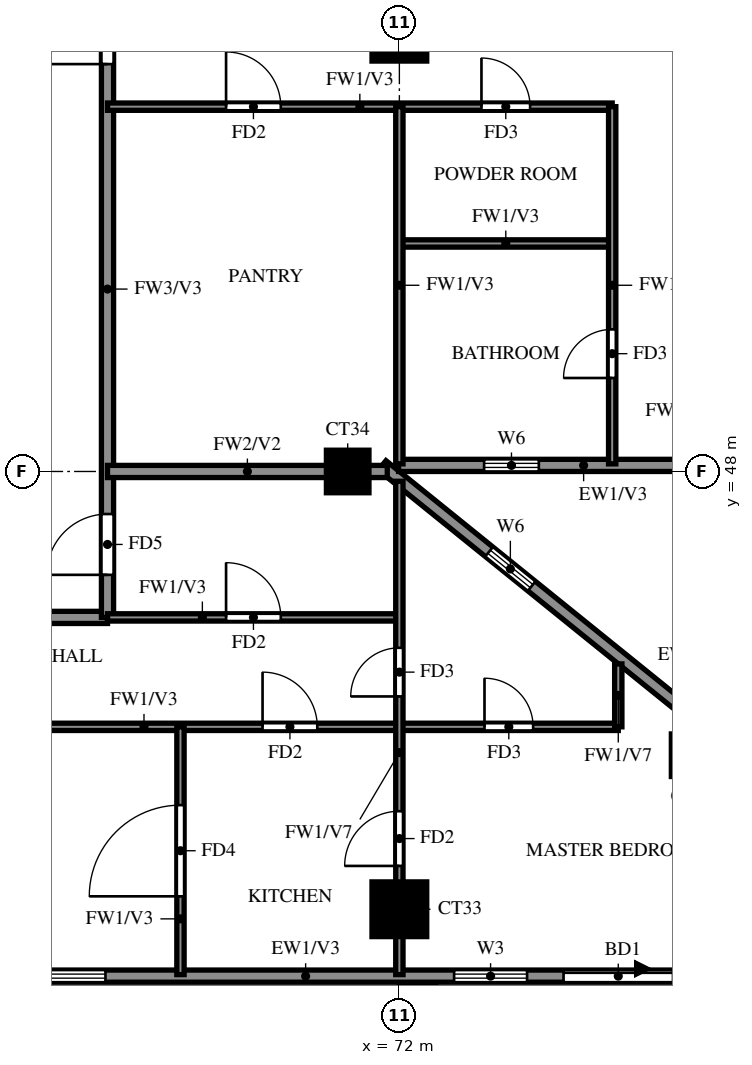
"""IFC4 building model, lengths in metres.
Left out: names, types, materials, properties, quantities, classifications, styles, units other than length and angle.
Written with IfcOpenShell. Run it as: python <this file> out.ifc"""

import sys

from ifc_helpers import new_model, si_unit, direction, frame, frame_2d, origin, origin_2d, place, context, subcontext, project, spatial, rectangle, extrude, source, transform, mapped, element, fill, save


model = new_model("IFC4")
c1 = context("Model", 3, precision=1e-05, world=origin(), true_north=direction((0.0, 1.0)))
c2 = subcontext(c1, "Body", "Model", "MODEL_VIEW")
j1 = project(units=[si_unit("LENGTHUNIT", "METRE"), si_unit("PLANEANGLEUNIT", "RADIAN")], contexts=[c1])
p1 = place(None, origin())
s1 = spatial("IfcSite", under=j1, at=p1, CompositionType="ELEMENT")
p2 = place(p1, origin())
s2 = spatial("IfcBuilding", under=s1, at=p2, CompositionType="ELEMENT")
p3 = place(p2, frame((0.0, 0.0, 222.0)))
s3 = spatial("IfcBuildingStorey", under=s2, at=p3, CompositionType="ELEMENT", Elevation=222.0)
m1 = source(origin(), c2, "Body", "SweptSolid", [
    extrude(rectangle(XDim=0.9, YDim=0.9, at=origin_2d()), origin(), (0.0, 0.0, 1.0), 3.22),
])
p4 = place(p3, frame((72.0, 40.8, 0.0), z_axis=(0.0, 0.0, 1.0), x_axis=(1.0, 0.0, 0.0)))
e1 = element("IfcColumn", 1, at=p4, inside=s3, PredefinedType="COLUMN", context=c2, shape_type="MappedRepresentation", body=[
    mapped(m1, transform((0.0, 0.0, 0.0))),
])
m2 = source(origin(), c2, "Body", "SweptSolid", [
    extrude(rectangle(XDim=0.7, YDim=0.7, at=origin_2d()), origin(), (0.0, 0.0, 1.0), 3.22),
])
for number, where, z_axis, x_axis in (
    (2, (76.823, 43.333, 0.0), (0.0, 0.0, 1.0), (1.0, 0.0, 0.0)),
    (3, (71.15, 48.0, 0.0), (0.0, 0.0, 1.0), (1.0, 0.0, 0.0)),
):
    element("IfcColumn", number, at=place(p3, frame(where, z_axis=z_axis, x_axis=x_axis)), inside=s3, PredefinedType="COLUMN", context=c2, shape_type="MappedRepresentation", body=[
        mapped(m2, transform((0.0, 0.0, 0.0))),
    ])
p5 = place(p3, frame((72.0, 55.2, 0.0), z_axis=(0.0, 0.0, 1.0), x_axis=(1.0, 0.0, 0.0)))
e4 = element("IfcColumn", 4, at=p5, inside=s3, PredefinedType="COLUMN", context=c2, shape_type="MappedRepresentation", body=[
    mapped(m1, transform((0.0, 0.0, 0.0))),
])
p6 = place(p3, frame((81.907, 39.87, 0.0), z_axis=(0.0, 0.0, 1.0), x_axis=(-0.777936274417, 0.62834318087, 0.0)))
e5 = element("IfcWall", 5, at=p6, inside=s3, PredefinedType="SOLIDWALL", context=c2, shape_type="SweptSolid", body=[
    extrude(rectangle(XDim=13.099, YDim=0.2, at=frame_2d((6.549, 0.0))), origin(), (0.0, 0.0, 1.0), 3.22),
])
p7 = place(p6, frame((9.938, 0.0, 1.5)))
e6 = element("IfcOpeningElement", 6, at=p7, cuts=e5, PredefinedType="OPENING", context=c2, shape_type="SweptSolid", body=[
    extrude(rectangle(XDim=0.9, YDim=0.9, at=frame_2d((0.45, 0.45))), frame((0.0, 0.11, 0.0), z_axis=(0.0, -1.0, 0.0), x_axis=(1.0, 0.0, 0.0)), (0.0, 0.0, 1.0), 0.22),
])
p8 = place(p3, frame((71.987, 48.1, 0.0), z_axis=(0.0, 0.0, 1.0), x_axis=(1.0, 0.0, 0.0)))
e7 = element("IfcWall", 7, at=p8, inside=s3, PredefinedType="SOLIDWALL", context=c2, shape_type="SweptSolid", body=[
    extrude(rectangle(XDim=6.763, YDim=0.2, at=frame_2d((3.381, 0.0))), origin(), (0.0, 0.0, 1.0), 3.22),
])
p9 = place(p8, frame((1.406, 0.0, 1.5)))
e8 = element("IfcOpeningElement", 8, at=p9, cuts=e7, PredefinedType="OPENING", context=c2, shape_type="SweptSolid", body=[
    extrude(rectangle(XDim=0.9, YDim=0.9, at=frame_2d((0.45, 0.45))), frame((0.0, 0.11, 0.0), z_axis=(0.0, -1.0, 0.0), x_axis=(1.0, 0.0, 0.0)), (0.0, 0.0, 1.0), 0.22),
])
p10 = place(p3, frame((58.8, 39.7, 0.0), z_axis=(0.0, 0.0, 1.0), x_axis=(1.0, 0.0, 0.0)))
e9 = element("IfcWall", 9, at=p10, inside=s3, PredefinedType="SOLIDWALL", context=c2, shape_type="SweptSolid", body=[
    extrude(rectangle(XDim=23.317, YDim=0.2, at=frame_2d((11.658, 0.0))), origin(), (0.0, 0.0, 1.0), 3.22),
])
p11 = place(p10, frame((15.9, 0.0, 0.0)))
e10 = element("IfcOpeningElement", 10, at=p11, cuts=e9, PredefinedType="OPENING", context=c2, shape_type="SweptSolid", body=[
    extrude(rectangle(XDim=1.8, YDim=2.4, at=frame_2d((0.9, 1.2))), frame((0.0, 0.11, 0.0), z_axis=(0.0, -1.0, 0.0), x_axis=(1.0, 0.0, 0.0)), (0.0, 0.0, 1.0), 0.22),
])
p12 = place(p10, frame((2.433, 0.0, 0.6)))
e11 = element("IfcOpeningElement", 11, at=p12, cuts=e9, PredefinedType="OPENING", context=c2, shape_type="SweptSolid", body=[
    extrude(rectangle(XDim=2.4, YDim=2.4, at=frame_2d((1.2, 1.2))), frame((0.0, 0.11, 0.0), z_axis=(0.0, -1.0, 0.0), x_axis=(1.0, 0.0, 0.0)), (0.0, 0.0, 1.0), 0.22),
])
p13 = place(p10, frame((5.967, 0.0, 0.6)))
e12 = element("IfcOpeningElement", 12, at=p13, cuts=e9, PredefinedType="OPENING", context=c2, shape_type="SweptSolid", body=[
    extrude(rectangle(XDim=2.4, YDim=2.4, at=frame_2d((1.2, 1.2))), frame((0.0, 0.11, 0.0), z_axis=(0.0, -1.0, 0.0), x_axis=(1.0, 0.0, 0.0)), (0.0, 0.0, 1.0), 0.22),
])
p14 = place(p10, frame((14.1, 0.0, 0.6)))
e13 = element("IfcOpeningElement", 13, at=p14, cuts=e9, PredefinedType="OPENING", context=c2, shape_type="SweptSolid", body=[
    extrude(rectangle(XDim=1.2, YDim=2.4, at=frame_2d((0.6, 1.2))), frame((0.0, 0.11, 0.0), z_axis=(0.0, -1.0, 0.0), x_axis=(1.0, 0.0, 0.0)), (0.0, 0.0, 1.0), 0.22),
])
p15 = place(p10, frame((18.3, 0.0, 0.6)))
e14 = element("IfcOpeningElement", 14, at=p15, cuts=e9, PredefinedType="OPENING", context=c2, shape_type="SweptSolid", body=[
    extrude(rectangle(XDim=1.2, YDim=2.4, at=frame_2d((0.6, 1.2))), frame((0.0, 0.11, 0.0), z_axis=(0.0, -1.0, 0.0), x_axis=(1.0, 0.0, 0.0)), (0.0, 0.0, 1.0), 0.22),
])
p16 = place(p10, frame((20.858, 0.0, 0.6)))
e15 = element("IfcOpeningElement", 15, at=p16, cuts=e9, PredefinedType="OPENING", context=c2, shape_type="SweptSolid", body=[
    extrude(rectangle(XDim=1.8, YDim=2.4, at=frame_2d((0.9, 1.2))), frame((0.0, 0.11, 0.0), z_axis=(0.0, -1.0, 0.0), x_axis=(1.0, 0.0, 0.0)), (0.0, 0.0, 1.0), 0.22),
])
p17 = place(p3, frame((60.0, 45.6, 0.0), z_axis=(0.0, 0.0, 1.0), x_axis=(1.0, 0.0, 0.0)))
e16 = element("IfcWall", 16, at=p17, inside=s3, PredefinedType="SOLIDWALL", context=c2, shape_type="SweptSolid", body=[
    extrude(rectangle(XDim=7.2, YDim=0.2, at=frame_2d((3.6, 0.0))), origin(), (0.0, 0.0, 1.0), 3.22),
])
p18 = place(p3, frame((67.2, 45.6, 0.0), z_axis=(0.0, 0.0, 1.0), x_axis=(0.0, 1.0, 0.0)))
e17 = element("IfcWall", 17, at=p18, inside=s3, PredefinedType="SOLIDWALL", context=c2, shape_type="SweptSolid", body=[
    extrude(rectangle(XDim=10.8, YDim=0.2, at=frame_2d((5.4, 0.0))), origin(), (0.0, 0.0, 1.0), 3.22),
])
p19 = place(p18, frame((9.1, 0.0, 0.0)))
e18 = element("IfcOpeningElement", 18, at=p19, cuts=e17, PredefinedType="OPENING", context=c2, shape_type="SweptSolid", body=[
    extrude(rectangle(XDim=1.0, YDim=2.1, at=frame_2d((0.5, 1.05))), frame((0.0, 0.11, 0.0), z_axis=(0.0, -1.0, 0.0), x_axis=(1.0, 0.0, 0.0)), (0.0, 0.0, 1.0), 0.22),
])
p20 = place(p18, frame((0.7, 0.0, 0.0)))
e19 = element("IfcOpeningElement", 19, at=p20, cuts=e17, PredefinedType="OPENING", context=c2, shape_type="SweptSolid", body=[
    extrude(rectangle(XDim=1.0, YDim=2.1, at=frame_2d((0.5, 1.05))), frame((0.0, 0.11, 0.0), z_axis=(0.0, -1.0, 0.0), x_axis=(1.0, 0.0, 0.0)), (0.0, 0.0, 1.0), 0.22),
])
p21 = place(p3, frame((67.2, 48.0, 0.0), z_axis=(0.0, 0.0, 1.0), x_axis=(1.0, 0.0, 0.0)))
e20 = element("IfcWall", 20, at=p21, inside=s3, PredefinedType="SOLIDWALL", context=c2, shape_type="SweptSolid", body=[
    extrude(rectangle(XDim=4.601, YDim=0.2, at=frame_2d((2.301, 0.0))), origin(), (0.0, 0.0, 1.0), 3.22),
])
p22 = place(p3, frame((60.0, 43.8, 0.0), z_axis=(0.0, 0.0, 1.0), x_axis=(1.0, 0.0, 0.0)))
e21 = element("IfcWall", 21, at=p22, inside=s3, PredefinedType="PARTITIONING", context=c2, shape_type="SweptSolid", body=[
    extrude(rectangle(XDim=15.6, YDim=0.12, at=frame_2d((7.8, 0.0))), origin(), (0.0, 0.0, 1.0), 3.22),
])
p23 = place(p22, frame((9.75, 0.0, 0.0)))
e22 = element("IfcOpeningElement", 22, at=p23, cuts=e21, PredefinedType="OPENING", context=c2, shape_type="SweptSolid", body=[
    extrude(rectangle(XDim=0.9, YDim=2.1, at=frame_2d((0.45, 1.05))), frame((0.0, 0.07, 0.0), z_axis=(0.0, -1.0, 0.0), x_axis=(1.0, 0.0, 0.0)), (0.0, 0.0, 1.0), 0.14),
])
p24 = place(p22, frame((3.45, 0.0, 0.0)))
e23 = element("IfcOpeningElement", 23, at=p24, cuts=e21, PredefinedType="OPENING", context=c2, shape_type="SweptSolid", body=[
    extrude(rectangle(XDim=1.5, YDim=2.1, at=frame_2d((0.75, 1.05))), frame((0.0, 0.07, 0.0), z_axis=(0.0, -1.0, 0.0), x_axis=(1.0, 0.0, 0.0)), (0.0, 0.0, 1.0), 0.14),
])
p25 = place(p22, frame((13.4, 0.0, 0.0)))
e24 = element("IfcOpeningElement", 24, at=p25, cuts=e21, PredefinedType="OPENING", context=c2, shape_type="SweptSolid", body=[
    extrude(rectangle(XDim=0.8, YDim=2.1, at=frame_2d((0.4, 1.05))), frame((0.0, 0.07, 0.0), z_axis=(0.0, -1.0, 0.0), x_axis=(1.0, 0.0, 0.0)), (0.0, 0.0, 1.0), 0.14),
])
p26 = place(p3, frame((67.2, 45.6, 0.0), z_axis=(0.0, 0.0, 1.0), x_axis=(1.0, 0.0, 0.0)))
e25 = element("IfcWall", 25, at=p26, inside=s3, PredefinedType="PARTITIONING", context=c2, shape_type="SweptSolid", body=[
    extrude(rectangle(XDim=4.8, YDim=0.12, at=frame_2d((2.4, 0.0))), origin(), (0.0, 0.0, 1.0), 3.22),
])
p27 = place(p26, frame((1.95, 0.0, 0.0)))
e26 = element("IfcOpeningElement", 26, at=p27, cuts=e25, PredefinedType="OPENING", context=c2, shape_type="SweptSolid", body=[
    extrude(rectangle(XDim=0.9, YDim=2.1, at=frame_2d((0.45, 1.05))), frame((0.0, 0.07, 0.0), z_axis=(0.0, -1.0, 0.0), x_axis=(1.0, 0.0, 0.0)), (0.0, 0.0, 1.0), 0.14),
])
p28 = place(p3, frame((72.0, 51.75, 0.0), z_axis=(0.0, 0.0, 1.0), x_axis=(1.0, 0.0, 0.0)))
e27 = element("IfcWall", 27, at=p28, inside=s3, PredefinedType="PARTITIONING", context=c2, shape_type="SweptSolid", body=[
    extrude(rectangle(XDim=3.5, YDim=0.12, at=frame_2d((1.75, 0.0))), origin(), (0.0, 0.0, 1.0), 3.22),
])
p29 = place(p3, frame((67.2, 54.0, 0.0), z_axis=(0.0, 0.0, 1.0), x_axis=(1.0, 0.0, 0.0)))
e28 = element("IfcWall", 28, at=p29, inside=s3, PredefinedType="PARTITIONING", context=c2, shape_type="SweptSolid", body=[
    extrude(rectangle(XDim=8.3, YDim=0.12, at=frame_2d((4.15, 0.0))), origin(), (0.0, 0.0, 1.0), 3.22),
])
p30 = place(p29, frame((6.15, 0.0, 0.0)))
e29 = element("IfcOpeningElement", 29, at=p30, cuts=e28, PredefinedType="OPENING", context=c2, shape_type="SweptSolid", body=[
    extrude(rectangle(XDim=0.8, YDim=2.1, at=frame_2d((0.4, 1.05))), frame((0.0, 0.07, 0.0), z_axis=(0.0, -1.0, 0.0), x_axis=(1.0, 0.0, 0.0)), (0.0, 0.0, 1.0), 0.14),
])
p31 = place(p29, frame((1.95, 0.0, 0.0)))
e30 = element("IfcOpeningElement", 30, at=p31, cuts=e28, PredefinedType="OPENING", context=c2, shape_type="SweptSolid", body=[
    extrude(rectangle(XDim=0.9, YDim=2.1, at=frame_2d((0.45, 1.05))), frame((0.0, 0.07, 0.0), z_axis=(0.0, -1.0, 0.0), x_axis=(1.0, 0.0, 0.0)), (0.0, 0.0, 1.0), 0.14),
])
p32 = place(p3, frame((68.4, 39.725, 0.0), z_axis=(0.0, 0.0, 1.0), x_axis=(0.0, 1.0, 0.0)))
e31 = element("IfcWall", 31, at=p32, inside=s3, PredefinedType="PARTITIONING", context=c2, shape_type="SweptSolid", body=[
    extrude(rectangle(XDim=4.075, YDim=0.12, at=frame_2d((2.038, 0.0))), origin(), (0.0, 0.0, 1.0), 3.22),
])
p33 = place(p32, frame((1.288, 0.0, 0.0)))
e32 = element("IfcOpeningElement", 32, at=p33, cuts=e31, PredefinedType="OPENING", context=c2, shape_type="SweptSolid", body=[
    extrude(rectangle(XDim=1.5, YDim=2.1, at=frame_2d((0.75, 1.05))), frame((0.0, 0.07, 0.0), z_axis=(0.0, -1.0, 0.0), x_axis=(1.0, 0.0, 0.0)), (0.0, 0.0, 1.0), 0.14),
])
p34 = place(p3, frame((72.0, 39.725, 0.0), z_axis=(0.0, 0.0, 1.0), x_axis=(0.0, 1.0, 0.0)))
e33 = element("IfcWall", 33, at=p34, inside=s3, PredefinedType="PARTITIONING", context=c2, shape_type="SweptSolid", body=[
    extrude(rectangle(XDim=8.114, YDim=0.12, at=frame_2d((4.057, 0.0))), origin(), (0.0, 0.0, 1.0), 2.32),
])
p35 = place(p34, frame((1.788, 0.0, 0.0)))
e34 = element("IfcOpeningElement", 34, at=p35, cuts=e33, PredefinedType="OPENING", context=c2, shape_type="SweptSolid", body=[
    extrude(rectangle(XDim=0.9, YDim=2.1, at=frame_2d((0.45, 1.05))), frame((0.0, 0.07, 0.0), z_axis=(0.0, -1.0, 0.0), x_axis=(1.0, 0.0, 0.0)), (0.0, 0.0, 1.0), 0.14),
])
p36 = place(p34, frame((4.575, 0.0, 0.0)))
e35 = element("IfcOpeningElement", 35, at=p36, cuts=e33, PredefinedType="OPENING", context=c2, shape_type="SweptSolid", body=[
    extrude(rectangle(XDim=0.8, YDim=2.1, at=frame_2d((0.4, 1.05))), frame((0.0, 0.07, 0.0), z_axis=(0.0, -1.0, 0.0), x_axis=(1.0, 0.0, 0.0)), (0.0, 0.0, 1.0), 0.14),
])
p37 = place(p3, frame((72.0, 48.125, 0.0), z_axis=(0.0, 0.0, 1.0), x_axis=(0.0, 1.0, 0.0)))
e36 = element("IfcWall", 36, at=p37, inside=s3, PredefinedType="PARTITIONING", context=c2, shape_type="SweptSolid", body=[
    extrude(rectangle(XDim=5.875, YDim=0.12, at=frame_2d((2.938, 0.0))), origin(), (0.0, 0.0, 1.0), 3.22),
])
p38 = place(p3, frame((75.5, 48.125, 0.0), z_axis=(0.0, 0.0, 1.0), x_axis=(0.0, 1.0, 0.0)))
e37 = element("IfcWall", 37, at=p38, inside=s3, PredefinedType="PARTITIONING", context=c2, shape_type="SweptSolid", body=[
    extrude(rectangle(XDim=5.875, YDim=0.12, at=frame_2d((2.938, 0.0))), origin(), (0.0, 0.0, 1.0), 3.22),
])
p39 = place(p38, frame((1.413, 0.0, 0.0)))
e38 = element("IfcOpeningElement", 38, at=p39, cuts=e37, PredefinedType="OPENING", context=c2, shape_type="SweptSolid", body=[
    extrude(rectangle(XDim=0.8, YDim=2.1, at=frame_2d((0.4, 1.05))), frame((0.0, 0.07, 0.0), z_axis=(0.0, -1.0, 0.0), x_axis=(1.0, 0.0, 0.0)), (0.0, 0.0, 1.0), 0.14),
])
p40 = place(p3, frame((75.6, 43.8, 0.0), z_axis=(0.0, 0.0, 1.0), x_axis=(0.0, 1.0, 0.0)))
e39 = element("IfcWall", 39, at=p40, inside=s3, PredefinedType="PARTITIONING", context=c2, shape_type="SweptSolid", body=[
    extrude(rectangle(XDim=1.035, YDim=0.12, at=frame_2d((0.518, 0.0))), origin(), (0.0, 0.0, 1.0), 2.32),
])
p41 = place(p7, origin())
e40 = element("IfcWindow", 40, at=p41, inside=s3, PartitioningType="SINGLE_PANEL", PredefinedType="WINDOW", context=c2, shape_type="SweptSolid", body=[
    extrude(rectangle(XDim=0.9, YDim=0.9, at=frame_2d((0.45, 0.45))), frame((0.0, 0.03, 0.0), z_axis=(0.0, -1.0, 0.0), x_axis=(1.0, 0.0, 0.0)), (0.0, 0.0, 1.0), 0.06),
])
fill(e6, e40)
p42 = place(p9, origin())
e41 = element("IfcWindow", 41, at=p42, inside=s3, PartitioningType="SINGLE_PANEL", PredefinedType="WINDOW", context=c2, shape_type="SweptSolid", body=[
    extrude(rectangle(XDim=0.9, YDim=0.9, at=frame_2d((0.45, 0.45))), frame((0.0, 0.03, 0.0), z_axis=(0.0, -1.0, 0.0), x_axis=(1.0, 0.0, 0.0)), (0.0, 0.0, 1.0), 0.06),
])
fill(e8, e41)
p43 = place(p11, origin())
e42 = element("IfcDoor", 42, at=p43, inside=s3, OperationType="DOUBLE_DOOR_SLIDING", PredefinedType="DOOR", context=c2, shape_type="SweptSolid", body=[
    extrude(rectangle(XDim=1.8, YDim=2.4, at=frame_2d((0.9, 1.2))), frame((0.0, 0.025, 0.0), z_axis=(0.0, -1.0, 0.0), x_axis=(1.0, 0.0, 0.0)), (0.0, 0.0, 1.0), 0.05),
])
fill(e10, e42)
p44 = place(p13, origin())
e43 = element("IfcWindow", 43, at=p44, inside=s3, PartitioningType="DOUBLE_PANEL_VERTICAL", PredefinedType="WINDOW", context=c2, shape_type="SweptSolid", body=[
    extrude(rectangle(XDim=2.4, YDim=2.4, at=frame_2d((1.2, 1.2))), frame((0.0, 0.03, 0.0), z_axis=(0.0, -1.0, 0.0), x_axis=(1.0, 0.0, 0.0)), (0.0, 0.0, 1.0), 0.06),
])
fill(e12, e43)
p45 = place(p14, origin())
e44 = element("IfcWindow", 44, at=p45, inside=s3, PartitioningType="SINGLE_PANEL", PredefinedType="WINDOW", context=c2, shape_type="SweptSolid", body=[
    extrude(rectangle(XDim=1.2, YDim=2.4, at=frame_2d((0.6, 1.2))), frame((0.0, 0.03, 0.0), z_axis=(0.0, -1.0, 0.0), x_axis=(1.0, 0.0, 0.0)), (0.0, 0.0, 1.0), 0.06),
])
fill(e13, e44)
p46 = place(p19, origin())
e45 = element("IfcDoor", 45, at=p46, inside=s3, OperationType="SINGLE_SWING_LEFT", PredefinedType="DOOR", context=c2, shape_type="SweptSolid", body=[
    extrude(rectangle(XDim=1.0, YDim=2.1, at=frame_2d((0.5, 1.05))), frame((0.0, 0.025, 0.0), z_axis=(0.0, -1.0, 0.0), x_axis=(1.0, 0.0, 0.0)), (0.0, 0.0, 1.0), 0.05),
])
fill(e18, e45)
p47 = place(p39, origin())
e46 = element("IfcDoor", 46, at=p47, inside=s3, OperationType="SINGLE_SWING_RIGHT", PredefinedType="DOOR", context=c2, shape_type="SweptSolid", body=[
    extrude(rectangle(XDim=0.8, YDim=2.1, at=frame_2d((0.4, 1.05))), frame((0.0, 0.025, 0.0), z_axis=(0.0, -1.0, 0.0), x_axis=(1.0, 0.0, 0.0)), (0.0, 0.0, 1.0), 0.05),
])
fill(e38, e46)
p48 = place(p30, origin())
e47 = element("IfcDoor", 47, at=p48, inside=s3, OperationType="SINGLE_SWING_LEFT", PredefinedType="DOOR", context=c2, shape_type="SweptSolid", body=[
    extrude(rectangle(XDim=0.8, YDim=2.1, at=frame_2d((0.4, 1.05))), frame((0.0, 0.025, 0.0), z_axis=(0.0, -1.0, 0.0), x_axis=(1.0, 0.0, 0.0)), (0.0, 0.0, 1.0), 0.05),
])
fill(e29, e47)
p49 = place(p31, origin())
e48 = element("IfcDoor", 48, at=p49, inside=s3, OperationType="SINGLE_SWING_RIGHT", PredefinedType="DOOR", context=c2, shape_type="SweptSolid", body=[
    extrude(rectangle(XDim=0.9, YDim=2.1, at=frame_2d((0.45, 1.05))), frame((0.0, 0.025, 0.0), z_axis=(0.0, -1.0, 0.0), x_axis=(1.0, 0.0, 0.0)), (0.0, 0.0, 1.0), 0.05),
])
fill(e30, e48)
p50 = place(p33, origin())
e49 = element("IfcDoor", 49, at=p50, inside=s3, OperationType="SINGLE_SWING_LEFT", PredefinedType="DOOR", context=c2, shape_type="SweptSolid", body=[
    extrude(rectangle(XDim=1.5, YDim=2.1, at=frame_2d((0.75, 1.05))), frame((0.0, 0.025, 0.0), z_axis=(0.0, -1.0, 0.0), x_axis=(1.0, 0.0, 0.0)), (0.0, 0.0, 1.0), 0.05),
])
fill(e32, e49)
p51 = place(p27, origin())
e50 = element("IfcDoor", 50, at=p51, inside=s3, OperationType="SINGLE_SWING_RIGHT", PredefinedType="DOOR", context=c2, shape_type="SweptSolid", body=[
    extrude(rectangle(XDim=0.9, YDim=2.1, at=frame_2d((0.45, 1.05))), frame((0.0, 0.025, 0.0), z_axis=(0.0, -1.0, 0.0), x_axis=(1.0, 0.0, 0.0)), (0.0, 0.0, 1.0), 0.05),
])
fill(e26, e50)
p52 = place(p20, origin())
e51 = element("IfcDoor", 51, at=p52, inside=s3, OperationType="SINGLE_SWING_LEFT", PredefinedType="DOOR", context=c2, shape_type="SweptSolid", body=[
    extrude(rectangle(XDim=1.0, YDim=2.1, at=frame_2d((0.5, 1.05))), frame((0.0, 0.025, 0.0), z_axis=(0.0, -1.0, 0.0), x_axis=(1.0, 0.0, 0.0)), (0.0, 0.0, 1.0), 0.05),
])
fill(e19, e51)
p53 = place(p23, origin())
e52 = element("IfcDoor", 52, at=p53, inside=s3, OperationType="SINGLE_SWING_LEFT", PredefinedType="DOOR", context=c2, shape_type="SweptSolid", body=[
    extrude(rectangle(XDim=0.9, YDim=2.1, at=frame_2d((0.45, 1.05))), frame((0.0, 0.025, 0.0), z_axis=(0.0, -1.0, 0.0), x_axis=(1.0, 0.0, 0.0)), (0.0, 0.0, 1.0), 0.05),
])
fill(e22, e52)
p54 = place(p35, origin())
e53 = element("IfcDoor", 53, at=p54, inside=s3, OperationType="SINGLE_SWING_RIGHT", PredefinedType="DOOR", context=c2, shape_type="SweptSolid", body=[
    extrude(rectangle(XDim=0.9, YDim=2.1, at=frame_2d((0.45, 1.05))), frame((0.0, 0.025, 0.0), z_axis=(0.0, -1.0, 0.0), x_axis=(1.0, 0.0, 0.0)), (0.0, 0.0, 1.0), 0.05),
])
fill(e34, e53)
p55 = place(p36, origin())
e54 = element("IfcDoor", 54, at=p55, inside=s3, OperationType="SINGLE_SWING_LEFT", PredefinedType="DOOR", context=c2, shape_type="SweptSolid", body=[
    extrude(rectangle(XDim=0.8, YDim=2.1, at=frame_2d((0.4, 1.05))), frame((0.0, 0.025, 0.0), z_axis=(0.0, -1.0, 0.0), x_axis=(1.0, 0.0, 0.0)), (0.0, 0.0, 1.0), 0.05),
])
fill(e35, e54)
p56 = place(p25, origin())
e55 = element("IfcDoor", 55, at=p56, inside=s3, OperationType="SINGLE_SWING_RIGHT", PredefinedType="DOOR", context=c2, shape_type="SweptSolid", body=[
    extrude(rectangle(XDim=0.8, YDim=2.1, at=frame_2d((0.4, 1.05))), frame((0.0, 0.025, 0.0), z_axis=(0.0, -1.0, 0.0), x_axis=(1.0, 0.0, 0.0)), (0.0, 0.0, 1.0), 0.05),
])
fill(e24, e55)
save(model, sys.argv[1])
